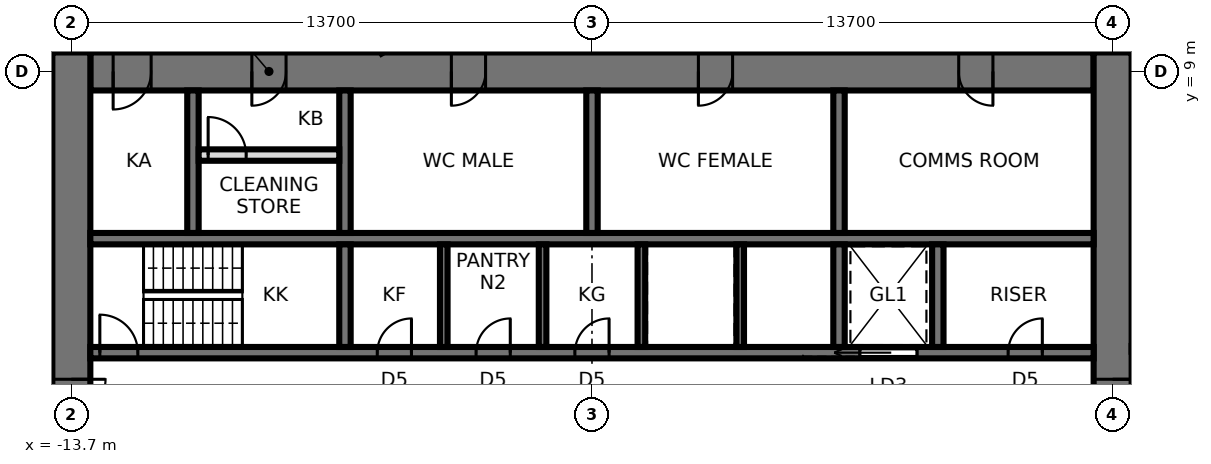
"""IFC4 building model, lengths in metres.
Left out: names, types, materials, properties, quantities, classifications, styles, units other than length and angle.
Written with IfcOpenShell. Run it as: python <this file> out.ifc"""

import sys

from ifc_helpers import new_model, si_unit, direction, frame, frame_2d, origin, place, context, subcontext, project, spatial, rectangle, extrude, element, fill, save


model = new_model("IFC4")
c1 = context("Model", 3, precision=1e-05, world=origin(), true_north=direction((0.0, 1.0)))
c2 = subcontext(c1, "Body", "Model", "MODEL_VIEW")
j1 = project(units=[si_unit("LENGTHUNIT", "METRE"), si_unit("PLANEANGLEUNIT", "RADIAN")], contexts=[c1])
p1 = place(None, origin())
s1 = spatial("IfcSite", under=j1, at=p1, CompositionType="ELEMENT")
p2 = place(p1, origin())
s2 = spatial("IfcBuilding", under=s1, at=p2, CompositionType="ELEMENT")
p3 = place(p2, frame((0.0, 0.0, 96.3)))
s3 = spatial("IfcBuildingStorey", under=s2, at=p3, CompositionType="ELEMENT", Elevation=96.3)
p4 = place(p3, frame((13.2, 9.0, 0.0), z_axis=(0.0, 0.0, 1.0), x_axis=(-1.0, 0.0, 0.0)))
e1 = element("IfcWall", 1, at=p4, inside=s3, PredefinedType="SHEAR", context=c2, shape_type="SweptSolid", body=[
    extrude(rectangle(XDim=26.4, YDim=1.0, at=frame_2d((13.2, 0.0))), origin(), (0.0, 0.0, 1.0), 3.9),
])
p5 = place(p4, frame((2.65, 0.0, 0.0)))
e2 = element("IfcOpeningElement", 2, at=p5, cuts=e1, PredefinedType="OPENING", context=c2, shape_type="SweptSolid", body=[
    extrude(rectangle(XDim=0.9, YDim=2.1, at=frame_2d((0.45, 1.05))), frame((0.0, 0.51, 0.0), z_axis=(0.0, -1.0, 0.0), x_axis=(1.0, 0.0, 0.0)), (0.0, 0.0, 1.0), 1.02),
])
p6 = place(p4, frame((9.5, 0.0, 0.0)))
e3 = element("IfcOpeningElement", 3, at=p6, cuts=e1, PredefinedType="OPENING", context=c2, shape_type="SweptSolid", body=[
    extrude(rectangle(XDim=0.9, YDim=2.1, at=frame_2d((0.45, 1.05))), frame((0.0, 0.51, 0.0), z_axis=(0.0, -1.0, 0.0), x_axis=(1.0, 0.0, 0.0)), (0.0, 0.0, 1.0), 1.02),
])
p7 = place(p4, frame((16.0, 0.0, 0.0)))
e4 = element("IfcOpeningElement", 4, at=p7, cuts=e1, PredefinedType="OPENING", context=c2, shape_type="SweptSolid", body=[
    extrude(rectangle(XDim=0.9, YDim=2.1, at=frame_2d((0.45, 1.05))), frame((0.0, 0.51, 0.0), z_axis=(0.0, -1.0, 0.0), x_axis=(1.0, 0.0, 0.0)), (0.0, 0.0, 1.0), 1.02),
])
p8 = place(p4, frame((21.25, 0.0, 0.0)))
e5 = element("IfcOpeningElement", 5, at=p8, cuts=e1, PredefinedType="OPENING", context=c2, shape_type="SweptSolid", body=[
    extrude(rectangle(XDim=0.9, YDim=2.1, at=frame_2d((0.45, 1.05))), frame((0.0, 0.51, 0.0), z_axis=(0.0, -1.0, 0.0), x_axis=(1.0, 0.0, 0.0)), (0.0, 0.0, 1.0), 1.02),
])
p9 = place(p4, frame((24.8, 0.0, 0.0)))
e6 = element("IfcOpeningElement", 6, at=p9, cuts=e1, PredefinedType="OPENING", context=c2, shape_type="SweptSolid", body=[
    extrude(rectangle(XDim=1.0, YDim=2.1, at=frame_2d((0.5, 1.05))), frame((0.0, 0.51, 0.0), z_axis=(0.0, -1.0, 0.0), x_axis=(1.0, 0.0, 0.0)), (0.0, 0.0, 1.0), 1.02),
])
p10 = place(p3, frame((13.7, -9.5, 0.0), z_axis=(0.0, 0.0, 1.0), x_axis=(0.0, 1.0, 0.0)))
e7 = element("IfcWall", 7, at=p10, inside=s3, PredefinedType="SHEAR", context=c2, shape_type="SweptSolid", body=[
    extrude(rectangle(XDim=19.0, YDim=1.0, at=frame_2d((9.5, 0.0))), origin(), (0.0, 0.0, 1.0), 3.9),
])
p11 = place(p10, frame((8.6, 0.0, 0.0)))
e8 = element("IfcOpeningElement", 8, at=p11, cuts=e7, PredefinedType="OPENING", context=c2, shape_type="SweptSolid", body=[
    extrude(rectangle(XDim=1.8, YDim=2.4, at=frame_2d((0.9, 1.2))), frame((0.0, 0.51, 0.0), z_axis=(0.0, -1.0, 0.0), x_axis=(1.0, 0.0, 0.0)), (0.0, 0.0, 1.0), 1.02),
])
p12 = place(p3, frame((-13.7, 9.5, 0.0), z_axis=(0.0, 0.0, 1.0), x_axis=(0.0, -1.0, 0.0)))
e9 = element("IfcWall", 9, at=p12, inside=s3, PredefinedType="SHEAR", context=c2, shape_type="SweptSolid", body=[
    extrude(rectangle(XDim=19.0, YDim=1.0, at=frame_2d((9.5, 0.0))), origin(), (0.0, 0.0, 1.0), 3.9),
])
p13 = place(p12, frame((8.6, 0.0, 0.0)))
e10 = element("IfcOpeningElement", 10, at=p13, cuts=e9, PredefinedType="OPENING", context=c2, shape_type="SweptSolid", body=[
    extrude(rectangle(XDim=1.8, YDim=2.4, at=frame_2d((0.9, 1.2))), frame((0.0, 0.51, 0.0), z_axis=(0.0, -1.0, 0.0), x_axis=(1.0, 0.0, 0.0)), (0.0, 0.0, 1.0), 1.02),
])
p14 = place(p3, frame((-13.2, 1.6, 0.0), z_axis=(0.0, 0.0, 1.0), x_axis=(1.0, 0.0, 0.0)))
e11 = element("IfcWall", 11, at=p14, inside=s3, PredefinedType="SHEAR", context=c2, shape_type="SweptSolid", body=[
    extrude(rectangle(XDim=26.4, YDim=0.3, at=frame_2d((13.2, 0.0))), origin(), (0.0, 0.0, 1.0), 3.9),
])
p15 = place(p14, frame((0.25, 0.0, 0.0)))
e12 = element("IfcOpeningElement", 12, at=p15, cuts=e11, PredefinedType="OPENING", context=c2, shape_type="SweptSolid", body=[
    extrude(rectangle(XDim=1.0, YDim=2.1, at=frame_2d((0.5, 1.05))), frame((0.0, 0.16, 0.0), z_axis=(0.0, -1.0, 0.0), x_axis=(1.0, 0.0, 0.0)), (0.0, 0.0, 1.0), 0.32),
])
p16 = place(p14, frame((20.25, 0.0, 0.0)))
e13 = element("IfcOpeningElement", 13, at=p16, cuts=e11, PredefinedType="OPENING", context=c2, shape_type="SweptSolid", body=[
    extrude(rectangle(XDim=1.5, YDim=2.4, at=frame_2d((0.75, 1.2))), frame((0.0, 0.16, 0.0), z_axis=(0.0, -1.0, 0.0), x_axis=(1.0, 0.0, 0.0)), (0.0, 0.0, 1.0), 0.32),
])
p17 = place(p14, frame((7.55, 0.0, 0.0)))
e14 = element("IfcOpeningElement", 14, at=p17, cuts=e11, PredefinedType="OPENING", context=c2, shape_type="SweptSolid", body=[
    extrude(rectangle(XDim=0.9, YDim=2.1, at=frame_2d((0.45, 1.05))), frame((0.0, 0.16, 0.0), z_axis=(0.0, -1.0, 0.0), x_axis=(1.0, 0.0, 0.0)), (0.0, 0.0, 1.0), 0.32),
])
p18 = place(p14, frame((10.15, 0.0, 0.0)))
e15 = element("IfcOpeningElement", 15, at=p18, cuts=e11, PredefinedType="OPENING", context=c2, shape_type="SweptSolid", body=[
    extrude(rectangle(XDim=0.9, YDim=2.1, at=frame_2d((0.45, 1.05))), frame((0.0, 0.16, 0.0), z_axis=(0.0, -1.0, 0.0), x_axis=(1.0, 0.0, 0.0)), (0.0, 0.0, 1.0), 0.32),
])
p19 = place(p14, frame((12.75, 0.0, 0.0)))
e16 = element("IfcOpeningElement", 16, at=p19, cuts=e11, PredefinedType="OPENING", context=c2, shape_type="SweptSolid", body=[
    extrude(rectangle(XDim=0.9, YDim=2.1, at=frame_2d((0.45, 1.05))), frame((0.0, 0.16, 0.0), z_axis=(0.0, -1.0, 0.0), x_axis=(1.0, 0.0, 0.0)), (0.0, 0.0, 1.0), 0.32),
])
p20 = place(p14, frame((24.15, 0.0, 0.0)))
e17 = element("IfcOpeningElement", 17, at=p20, cuts=e11, PredefinedType="OPENING", context=c2, shape_type="SweptSolid", body=[
    extrude(rectangle(XDim=0.9, YDim=2.1, at=frame_2d((0.45, 1.05))), frame((0.0, 0.16, 0.0), z_axis=(0.0, -1.0, 0.0), x_axis=(1.0, 0.0, 0.0)), (0.0, 0.0, 1.0), 0.32),
])
p21 = place(p3, frame((-13.2, 4.6, 0.0), z_axis=(0.0, 0.0, 1.0), x_axis=(1.0, 0.0, 0.0)))
e18 = element("IfcWall", 18, at=p21, inside=s3, PredefinedType="SHEAR", context=c2, shape_type="SweptSolid", body=[
    extrude(rectangle(XDim=26.4, YDim=0.3, at=frame_2d((13.2, 0.0))), origin(), (0.0, 0.0, 1.0), 3.9),
])
p22 = place(p3, frame((-6.5, 1.75, 0.0), z_axis=(0.0, 0.0, 1.0), x_axis=(0.0, 1.0, 0.0)))
e19 = element("IfcWall", 19, at=p22, inside=s3, PredefinedType="SHEAR", context=c2, shape_type="SweptSolid", body=[
    extrude(rectangle(XDim=2.7, YDim=0.3, at=frame_2d((1.35, 0.0))), origin(), (0.0, 0.0, 1.0), 3.9),
])
p23 = place(p3, frame((-6.5, 4.75, 0.0), z_axis=(0.0, 0.0, 1.0), x_axis=(0.0, 1.0, 0.0)))
e20 = element("IfcWall", 20, at=p23, inside=s3, PredefinedType="SHEAR", context=c2, shape_type="SweptSolid", body=[
    extrude(rectangle(XDim=3.75, YDim=0.3, at=frame_2d((1.875, 0.0))), origin(), (0.0, 0.0, 1.0), 3.9),
])
p24 = place(p3, frame((6.5, 1.75, 0.0), z_axis=(0.0, 0.0, 1.0), x_axis=(0.0, 1.0, 0.0)))
e21 = element("IfcWall", 21, at=p24, inside=s3, PredefinedType="SHEAR", context=c2, shape_type="SweptSolid", body=[
    extrude(rectangle(XDim=2.7, YDim=0.3, at=frame_2d((1.35, 0.0))), origin(), (0.0, 0.0, 1.0), 3.9),
])
p25 = place(p3, frame((6.5, 4.75, 0.0), z_axis=(0.0, 0.0, 1.0), x_axis=(0.0, 1.0, 0.0)))
e22 = element("IfcWall", 22, at=p25, inside=s3, PredefinedType="SHEAR", context=c2, shape_type="SweptSolid", body=[
    extrude(rectangle(XDim=3.75, YDim=0.3, at=frame_2d((1.875, 0.0))), origin(), (0.0, 0.0, 1.0), 3.9),
])
for number, where, z_axis, x_axis in (
    (23, (-3.9, 1.75, 0.0), (0.0, 0.0, 1.0), (0.0, 1.0, 0.0)),
    (24, (-1.3, 1.75, 0.0), (0.0, 0.0, 1.0), (0.0, 1.0, 0.0)),
    (25, (1.3, 1.75, 0.0), (0.0, 0.0, 1.0), (0.0, 1.0, 0.0)),
    (26, (3.9, 1.75, 0.0), (0.0, 0.0, 1.0), (0.0, 1.0, 0.0)),
):
    element("IfcWall", number, at=place(p3, frame(where, z_axis=z_axis, x_axis=x_axis)), inside=s3, PredefinedType="SHEAR", context=c2, shape_type="SweptSolid", body=[
        extrude(rectangle(XDim=2.7, YDim=0.2, at=frame_2d((1.35, 0.0))), origin(), (0.0, 0.0, 1.0), 3.9),
    ])
for number, where, z_axis, x_axis in (
    (27, (0.0, 4.75, 0.0), (0.0, 0.0, 1.0), (0.0, 1.0, 0.0)),
    (28, (-10.5, 4.75, 0.0), (0.0, 0.0, 1.0), (0.0, 1.0, 0.0)),
):
    element("IfcWall", number, at=place(p3, frame(where, z_axis=z_axis, x_axis=x_axis)), inside=s3, PredefinedType="SHEAR", context=c2, shape_type="SweptSolid", body=[
        extrude(rectangle(XDim=3.75, YDim=0.3, at=frame_2d((1.875, 0.0))), origin(), (0.0, 0.0, 1.0), 3.9),
    ])
p26 = place(p3, frame((9.1, 1.75, 0.0), z_axis=(0.0, 0.0, 1.0), x_axis=(0.0, 1.0, 0.0)))
e29 = element("IfcWall", 29, at=p26, inside=s3, PredefinedType="SHEAR", context=c2, shape_type="SweptSolid", body=[
    extrude(rectangle(XDim=2.7, YDim=0.3, at=frame_2d((1.35, 0.0))), origin(), (0.0, 0.0, 1.0), 3.9),
])
p27 = place(p3, frame((-10.35, 6.8, 0.0), z_axis=(0.0, 0.0, 1.0), x_axis=(1.0, 0.0, 0.0)))
e30 = element("IfcWall", 30, at=p27, inside=s3, PredefinedType="PARTITIONING", context=c2, shape_type="SweptSolid", body=[
    extrude(rectangle(XDim=3.7, YDim=0.3, at=frame_2d((1.85, 0.0))), origin(), (0.0, 0.0, 1.0), 3.74),
])
p28 = place(p27, frame((0.25, 0.0, 0.0)))
e31 = element("IfcOpeningElement", 31, at=p28, cuts=e30, PredefinedType="OPENING", context=c2, shape_type="SweptSolid", body=[
    extrude(rectangle(XDim=1.0, YDim=2.4, at=frame_2d((0.5, 1.2))), frame((0.0, 0.16, 0.0), z_axis=(0.0, -1.0, 0.0), x_axis=(1.0, 0.0, 0.0)), (0.0, 0.0, 1.0), 0.32),
])
p29 = place(p3, frame((18.4, 1.7, 0.0), z_axis=(0.0, 0.0, 1.0), x_axis=(-1.0, 0.0, 0.0)))
e32 = element("IfcWall", 32, at=p29, inside=s3, PredefinedType="PARTITIONING", context=c2, shape_type="SweptSolid", body=[
    extrude(rectangle(XDim=4.2, YDim=0.15, at=frame_2d((2.1, 0.0))), origin(), (0.0, 0.0, 1.0), 3.74),
])
p30 = place(p3, frame((-5.485, 9.5, 0.0), z_axis=(0.0, 0.0, 1.0), x_axis=(-0.500002645523, 0.866023876385, 0.0)))
e33 = element("IfcWall", 33, at=p30, inside=s3, PredefinedType="PARTITIONING", context=c2, shape_type="SweptSolid", body=[
    extrude(rectangle(XDim=11.54, YDim=0.12, at=frame_2d((5.77, 0.0))), origin(), (0.0, 0.0, 1.0), 3.74),
])
p31 = place(p30, frame((5.27, 0.0, 0.0)))
e34 = element("IfcOpeningElement", 34, at=p31, cuts=e33, PredefinedType="OPENING", context=c2, shape_type="SweptSolid", body=[
    extrude(rectangle(XDim=1.0, YDim=2.4, at=frame_2d((0.5, 1.2))), frame((0.0, 0.07, 0.0), z_axis=(0.0, -1.0, 0.0), x_axis=(1.0, 0.0, 0.0)), (0.0, 0.0, 1.0), 0.14),
])
p32 = place(p13, origin())
e35 = element("IfcDoor", 35, at=p32, inside=s3, OperationType="DOUBLE_DOOR_SINGLE_SWING", PredefinedType="DOOR", context=c2, shape_type="SweptSolid", body=[
    extrude(rectangle(XDim=1.72, YDim=2.36, at=frame_2d((0.9, 1.18))), frame((0.0, 0.025, 0.0), z_axis=(0.0, -1.0, 0.0), x_axis=(1.0, 0.0, 0.0)), (0.0, 0.0, 1.0), 0.05),
    extrude(rectangle(XDim=0.04, YDim=2.4, at=frame_2d((0.02, 1.2))), frame((0.0, 0.25, 0.0), z_axis=(0.0, -1.0, 0.0), x_axis=(1.0, 0.0, 0.0)), (0.0, 0.0, 1.0), 0.5),
    extrude(rectangle(XDim=0.04, YDim=2.4, at=frame_2d((1.78, 1.2))), frame((0.0, 0.25, 0.0), z_axis=(0.0, -1.0, 0.0), x_axis=(1.0, 0.0, 0.0)), (0.0, 0.0, 1.0), 0.5),
    extrude(rectangle(XDim=1.72, YDim=0.04, at=frame_2d((0.9, 2.38))), frame((0.0, 0.25, 0.0), z_axis=(0.0, -1.0, 0.0), x_axis=(1.0, 0.0, 0.0)), (0.0, 0.0, 1.0), 0.5),
])
fill(e10, e35)
p33 = place(p11, frame((1.8, 0.0, 0.0), z_axis=(0.0, 0.0, 1.0), x_axis=(-1.0, 0.0, 0.0)))
e36 = element("IfcDoor", 36, at=p33, inside=s3, OperationType="DOUBLE_DOOR_SINGLE_SWING", PredefinedType="DOOR", context=c2, shape_type="SweptSolid", body=[
    extrude(rectangle(XDim=1.72, YDim=2.36, at=frame_2d((0.9, 1.18))), frame((0.0, 0.025, 0.0), z_axis=(0.0, -1.0, 0.0), x_axis=(1.0, 0.0, 0.0)), (0.0, 0.0, 1.0), 0.05),
    extrude(rectangle(XDim=0.04, YDim=2.4, at=frame_2d((1.78, 1.2))), frame((0.0, 0.25, 0.0), z_axis=(0.0, -1.0, 0.0), x_axis=(1.0, 0.0, 0.0)), (0.0, 0.0, 1.0), 0.5),
    extrude(rectangle(XDim=0.04, YDim=2.4, at=frame_2d((0.02, 1.2))), frame((0.0, 0.25, 0.0), z_axis=(0.0, -1.0, 0.0), x_axis=(1.0, 0.0, 0.0)), (0.0, 0.0, 1.0), 0.5),
    extrude(rectangle(XDim=1.72, YDim=0.04, at=frame_2d((0.9, 2.38))), frame((0.0, 0.25, 0.0), z_axis=(0.0, -1.0, 0.0), x_axis=(1.0, 0.0, 0.0)), (0.0, 0.0, 1.0), 0.5),
])
fill(e8, e36)
p34 = place(p15, origin())
e37 = element("IfcDoor", 37, at=p34, inside=s3, OperationType="SINGLE_SWING_LEFT", PredefinedType="DOOR", context=c2, shape_type="SweptSolid", body=[
    extrude(rectangle(XDim=1.0, YDim=2.1, at=frame_2d((0.5, 1.05))), frame((0.0, 0.025, 0.0), z_axis=(0.0, -1.0, 0.0), x_axis=(1.0, 0.0, 0.0)), (0.0, 0.0, 1.0), 0.05),
])
fill(e12, e37)
p35 = place(p16, origin())
e38 = element("IfcDoor", 38, at=p35, inside=s3, OperationType="SLIDING_TO_LEFT", PredefinedType="DOOR", context=c2, shape_type="SweptSolid", body=[
    extrude(rectangle(XDim=1.5, YDim=2.4, at=frame_2d((0.75, 1.2))), frame((0.0, 0.025, 0.0), z_axis=(0.0, -1.0, 0.0), x_axis=(1.0, 0.0, 0.0)), (0.0, 0.0, 1.0), 0.05),
])
fill(e13, e38)
p36 = place(p17, origin())
e39 = element("IfcDoor", 39, at=p36, inside=s3, OperationType="SINGLE_SWING_RIGHT", PredefinedType="DOOR", context=c2, shape_type="SweptSolid", body=[
    extrude(rectangle(XDim=0.9, YDim=2.1, at=frame_2d((0.45, 1.05))), frame((0.0, 0.025, 0.0), z_axis=(0.0, -1.0, 0.0), x_axis=(1.0, 0.0, 0.0)), (0.0, 0.0, 1.0), 0.05),
])
fill(e14, e39)
p37 = place(p18, origin())
e40 = element("IfcDoor", 40, at=p37, inside=s3, OperationType="SINGLE_SWING_RIGHT", PredefinedType="DOOR", context=c2, shape_type="SweptSolid", body=[
    extrude(rectangle(XDim=0.9, YDim=2.1, at=frame_2d((0.45, 1.05))), frame((0.0, 0.025, 0.0), z_axis=(0.0, -1.0, 0.0), x_axis=(1.0, 0.0, 0.0)), (0.0, 0.0, 1.0), 0.05),
])
fill(e15, e40)
p38 = place(p19, origin())
e41 = element("IfcDoor", 41, at=p38, inside=s3, OperationType="SINGLE_SWING_RIGHT", PredefinedType="DOOR", context=c2, shape_type="SweptSolid", body=[
    extrude(rectangle(XDim=0.9, YDim=2.1, at=frame_2d((0.45, 1.05))), frame((0.0, 0.025, 0.0), z_axis=(0.0, -1.0, 0.0), x_axis=(1.0, 0.0, 0.0)), (0.0, 0.0, 1.0), 0.05),
])
fill(e16, e41)
p39 = place(p20, origin())
e42 = element("IfcDoor", 42, at=p39, inside=s3, OperationType="SINGLE_SWING_RIGHT", PredefinedType="DOOR", context=c2, shape_type="SweptSolid", body=[
    extrude(rectangle(XDim=0.9, YDim=2.1, at=frame_2d((0.45, 1.05))), frame((0.0, 0.025, 0.0), z_axis=(0.0, -1.0, 0.0), x_axis=(1.0, 0.0, 0.0)), (0.0, 0.0, 1.0), 0.05),
])
fill(e17, e42)
p40 = place(p5, origin())
e43 = element("IfcDoor", 43, at=p40, inside=s3, OperationType="SINGLE_SWING_LEFT", PredefinedType="DOOR", context=c2, shape_type="SweptSolid", body=[
    extrude(rectangle(XDim=0.82, YDim=2.06, at=frame_2d((0.45, 1.03))), frame((0.0, 0.025, 0.0), z_axis=(0.0, -1.0, 0.0), x_axis=(1.0, 0.0, 0.0)), (0.0, 0.0, 1.0), 0.05),
    extrude(rectangle(XDim=0.04, YDim=2.1, at=frame_2d((0.02, 1.05))), frame((0.0, 0.25, 0.0), z_axis=(0.0, -1.0, 0.0), x_axis=(1.0, 0.0, 0.0)), (0.0, 0.0, 1.0), 0.5),
    extrude(rectangle(XDim=0.04, YDim=2.1, at=frame_2d((0.88, 1.05))), frame((0.0, 0.25, 0.0), z_axis=(0.0, -1.0, 0.0), x_axis=(1.0, 0.0, 0.0)), (0.0, 0.0, 1.0), 0.5),
    extrude(rectangle(XDim=0.82, YDim=0.04, at=frame_2d((0.45, 2.08))), frame((0.0, 0.25, 0.0), z_axis=(0.0, -1.0, 0.0), x_axis=(1.0, 0.0, 0.0)), (0.0, 0.0, 1.0), 0.5),
])
fill(e2, e43)
p41 = place(p6, origin())
e44 = element("IfcDoor", 44, at=p41, inside=s3, OperationType="SINGLE_SWING_RIGHT", PredefinedType="DOOR", context=c2, shape_type="SweptSolid", body=[
    extrude(rectangle(XDim=0.82, YDim=2.06, at=frame_2d((0.45, 1.03))), frame((0.0, 0.025, 0.0), z_axis=(0.0, -1.0, 0.0), x_axis=(1.0, 0.0, 0.0)), (0.0, 0.0, 1.0), 0.05),
    extrude(rectangle(XDim=0.04, YDim=2.1, at=frame_2d((0.02, 1.05))), frame((0.0, 0.25, 0.0), z_axis=(0.0, -1.0, 0.0), x_axis=(1.0, 0.0, 0.0)), (0.0, 0.0, 1.0), 0.5),
    extrude(rectangle(XDim=0.04, YDim=2.1, at=frame_2d((0.88, 1.05))), frame((0.0, 0.25, 0.0), z_axis=(0.0, -1.0, 0.0), x_axis=(1.0, 0.0, 0.0)), (0.0, 0.0, 1.0), 0.5),
    extrude(rectangle(XDim=0.82, YDim=0.04, at=frame_2d((0.45, 2.08))), frame((0.0, 0.25, 0.0), z_axis=(0.0, -1.0, 0.0), x_axis=(1.0, 0.0, 0.0)), (0.0, 0.0, 1.0), 0.5),
])
fill(e3, e44)
p42 = place(p7, origin())
e45 = element("IfcDoor", 45, at=p42, inside=s3, OperationType="SINGLE_SWING_RIGHT", PredefinedType="DOOR", context=c2, shape_type="SweptSolid", body=[
    extrude(rectangle(XDim=0.82, YDim=2.06, at=frame_2d((0.45, 1.03))), frame((0.0, 0.025, 0.0), z_axis=(0.0, -1.0, 0.0), x_axis=(1.0, 0.0, 0.0)), (0.0, 0.0, 1.0), 0.05),
    extrude(rectangle(XDim=0.04, YDim=2.1, at=frame_2d((0.02, 1.05))), frame((0.0, 0.25, 0.0), z_axis=(0.0, -1.0, 0.0), x_axis=(1.0, 0.0, 0.0)), (0.0, 0.0, 1.0), 0.5),
    extrude(rectangle(XDim=0.04, YDim=2.1, at=frame_2d((0.88, 1.05))), frame((0.0, 0.25, 0.0), z_axis=(0.0, -1.0, 0.0), x_axis=(1.0, 0.0, 0.0)), (0.0, 0.0, 1.0), 0.5),
    extrude(rectangle(XDim=0.82, YDim=0.04, at=frame_2d((0.45, 2.08))), frame((0.0, 0.25, 0.0), z_axis=(0.0, -1.0, 0.0), x_axis=(1.0, 0.0, 0.0)), (0.0, 0.0, 1.0), 0.5),
])
fill(e4, e45)
p43 = place(p8, origin())
e46 = element("IfcDoor", 46, at=p43, inside=s3, OperationType="SINGLE_SWING_RIGHT", PredefinedType="DOOR", context=c2, shape_type="SweptSolid", body=[
    extrude(rectangle(XDim=0.82, YDim=2.06, at=frame_2d((0.45, 1.03))), frame((0.0, 0.025, 0.0), z_axis=(0.0, -1.0, 0.0), x_axis=(1.0, 0.0, 0.0)), (0.0, 0.0, 1.0), 0.05),
    extrude(rectangle(XDim=0.04, YDim=2.1, at=frame_2d((0.02, 1.05))), frame((0.0, 0.25, 0.0), z_axis=(0.0, -1.0, 0.0), x_axis=(1.0, 0.0, 0.0)), (0.0, 0.0, 1.0), 0.5),
    extrude(rectangle(XDim=0.04, YDim=2.1, at=frame_2d((0.88, 1.05))), frame((0.0, 0.25, 0.0), z_axis=(0.0, -1.0, 0.0), x_axis=(1.0, 0.0, 0.0)), (0.0, 0.0, 1.0), 0.5),
    extrude(rectangle(XDim=0.82, YDim=0.04, at=frame_2d((0.45, 2.08))), frame((0.0, 0.25, 0.0), z_axis=(0.0, -1.0, 0.0), x_axis=(1.0, 0.0, 0.0)), (0.0, 0.0, 1.0), 0.5),
])
fill(e5, e46)
p44 = place(p9, origin())
e47 = element("IfcDoor", 47, at=p44, inside=s3, OperationType="SINGLE_SWING_RIGHT", PredefinedType="DOOR", context=c2, shape_type="SweptSolid", body=[
    extrude(rectangle(XDim=0.92, YDim=2.06, at=frame_2d((0.5, 1.03))), frame((0.0, 0.025, 0.0), z_axis=(0.0, -1.0, 0.0), x_axis=(1.0, 0.0, 0.0)), (0.0, 0.0, 1.0), 0.05),
    extrude(rectangle(XDim=0.04, YDim=2.1, at=frame_2d((0.02, 1.05))), frame((0.0, 0.25, 0.0), z_axis=(0.0, -1.0, 0.0), x_axis=(1.0, 0.0, 0.0)), (0.0, 0.0, 1.0), 0.5),
    extrude(rectangle(XDim=0.04, YDim=2.1, at=frame_2d((0.98, 1.05))), frame((0.0, 0.25, 0.0), z_axis=(0.0, -1.0, 0.0), x_axis=(1.0, 0.0, 0.0)), (0.0, 0.0, 1.0), 0.5),
    extrude(rectangle(XDim=0.92, YDim=0.04, at=frame_2d((0.5, 2.08))), frame((0.0, 0.25, 0.0), z_axis=(0.0, -1.0, 0.0), x_axis=(1.0, 0.0, 0.0)), (0.0, 0.0, 1.0), 0.5),
])
fill(e6, e47)
p45 = place(p28, origin())
e48 = element("IfcDoor", 48, at=p45, inside=s3, OperationType="SINGLE_SWING_LEFT", PredefinedType="DOOR", context=c2, shape_type="SweptSolid", body=[
    extrude(rectangle(XDim=1.0, YDim=2.4, at=frame_2d((0.5, 1.2))), frame((0.0, 0.025, 0.0), z_axis=(0.0, -1.0, 0.0), x_axis=(1.0, 0.0, 0.0)), (0.0, 0.0, 1.0), 0.05),
])
fill(e31, e48)
save(model, sys.argv[1])
